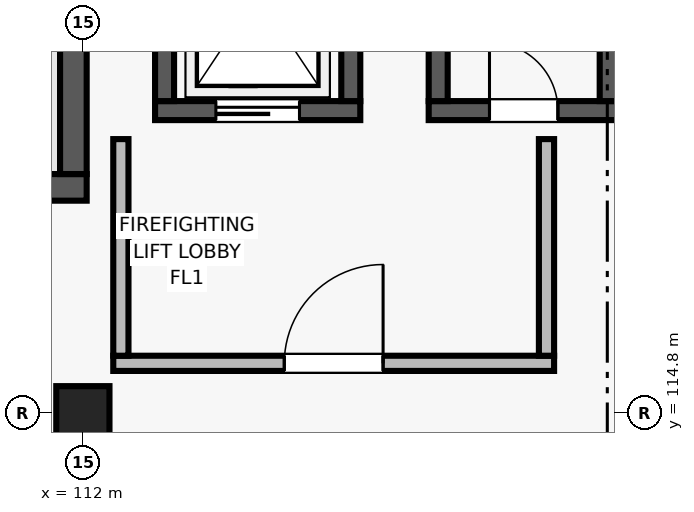
"""IFC4 building model, lengths in metres.
Left out: names, types, materials, properties, quantities, classifications, styles, units other than length and angle.
Written with IfcOpenShell. Run it as: python <this file> out.ifc"""

import sys

from ifc_helpers import new_model, si_unit, direction, frame, frame_2d, origin, origin_2d, place, context, subcontext, project, spatial, rectangle, extrude, element, fill, save


model = new_model("IFC4")
c1 = context("Model", 3, precision=1e-05, world=origin(), true_north=direction((0.0, 1.0)))
c2 = subcontext(c1, "Body", "Model", "MODEL_VIEW")
j1 = project(units=[si_unit("LENGTHUNIT", "METRE"), si_unit("PLANEANGLEUNIT", "RADIAN")], contexts=[c1])
p1 = place(None, origin())
s1 = spatial("IfcSite", under=j1, at=p1, CompositionType="ELEMENT")
p2 = place(p1, origin())
s2 = spatial("IfcBuilding", under=s1, at=p2, CompositionType="ELEMENT")
p3 = place(p2, origin())
s3 = spatial("IfcBuildingStorey", under=s2, at=p3, CompositionType="ELEMENT", Elevation=0.0)
p4 = place(p3, frame((112.0, 114.8, 0.0), z_axis=(0.0, 0.0, 1.0), x_axis=(1.0, 0.0, 0.0)))
e1 = element("IfcColumn", 1, at=p4, inside=s3, PredefinedType="COLUMN", context=c2, shape_type="SweptSolid", body=[
    extrude(rectangle(XDim=0.7, YDim=0.7, at=origin_2d()), origin(), (0.0, 0.0, 1.0), 4.5),
])
p5 = place(p3, frame((103.95, 117.765, 0.0), z_axis=(0.0, 0.0, 1.0), x_axis=(1.0, 0.0, 0.0)))
e2 = element("IfcWall", 2, at=p5, inside=s3, PredefinedType="SHEAR", context=c2, shape_type="SweptSolid", body=[
    extrude(rectangle(XDim=8.1, YDim=0.35, at=frame_2d((4.05, 0.0))), origin(), (0.0, 0.0, 1.0), 4.22),
])
p6 = place(p5, frame((0.6, 0.0, 0.0)))
e3 = element("IfcOpeningElement", 3, at=p6, cuts=e2, PredefinedType="OPENING", context=c2, shape_type="SweptSolid", body=[
    extrude(rectangle(XDim=1.25, YDim=2.2, at=frame_2d((0.625, 1.1))), frame((0.0, 0.185, 0.0), z_axis=(0.0, -1.0, 0.0), x_axis=(1.0, 0.0, 0.0)), (0.0, 0.0, 1.0), 0.37),
])
p7 = place(p3, frame((111.875, 117.94, 0.0), z_axis=(0.0, 0.0, 1.0), x_axis=(0.0, 1.0, 0.0)))
e4 = element("IfcWall", 4, at=p7, inside=s3, PredefinedType="SHEAR", context=c2, shape_type="SweptSolid", body=[
    extrude(rectangle(XDim=3.76, YDim=0.35, at=frame_2d((1.88, 0.0))), origin(), (0.0, 0.0, 1.0), 4.22),
])
p8 = place(p3, frame((112.95, 118.775, 0.0), z_axis=(0.0, 0.0, 1.0), x_axis=(1.0, 0.0, 0.0)))
e5 = element("IfcWall", 5, at=p8, inside=s3, PredefinedType="SHEAR", context=c2, shape_type="SweptSolid", body=[
    extrude(rectangle(XDim=2.7, YDim=0.25, at=frame_2d((1.35, 0.0))), origin(), (0.0, 0.0, 1.0), 4.22),
])
p9 = place(p8, frame((0.8, 0.0, 0.0)))
e6 = element("IfcOpeningElement", 6, at=p9, cuts=e5, PredefinedType="OPENING", context=c2, shape_type="SweptSolid", body=[
    extrude(rectangle(XDim=1.1, YDim=2.15, at=frame_2d((0.55, 1.075))), frame((0.0, 0.135, 0.0), z_axis=(0.0, -1.0, 0.0), x_axis=(1.0, 0.0, 0.0)), (0.0, 0.0, 1.0), 0.27),
])
for number, where, z_axis, x_axis in (
    (7, (113.075, 118.9, 0.0), (0.0, 0.0, 1.0), (0.0, 1.0, 0.0)),
    (8, (115.525, 118.9, 0.0), (0.0, 0.0, 1.0), (0.0, 1.0, 0.0)),
):
    element("IfcWall", number, at=place(p3, frame(where, z_axis=z_axis, x_axis=x_axis)), inside=s3, PredefinedType="SHEAR", context=c2, shape_type="SweptSolid", body=[
        extrude(rectangle(XDim=2.8, YDim=0.25, at=frame_2d((1.4, 0.0))), origin(), (0.0, 0.0, 1.0), 4.22),
    ])
p10 = place(p3, frame((112.4, 115.45, 0.0), z_axis=(0.0, 0.0, 1.0), x_axis=(1.0, 0.0, 0.0)))
e9 = element("IfcWall", 9, at=p10, inside=s3, PredefinedType="SOLIDWALL", context=c2, shape_type="SweptSolid", body=[
    extrude(rectangle(XDim=5.8, YDim=0.2, at=frame_2d((2.9, 0.0))), origin(), (0.0, 0.0, 1.0), 4.22),
])
p11 = place(p10, frame((2.25, 0.0, 0.0)))
e10 = element("IfcOpeningElement", 10, at=p11, cuts=e9, PredefinedType="OPENING", context=c2, shape_type="SweptSolid", body=[
    extrude(rectangle(XDim=1.3, YDim=2.2, at=frame_2d((0.65, 1.1))), frame((0.0, 0.11, 0.0), z_axis=(0.0, -1.0, 0.0), x_axis=(1.0, 0.0, 0.0)), (0.0, 0.0, 1.0), 0.22),
])
for number, where, z_axis, x_axis in (
    (11, (112.5, 115.55, 0.0), (0.0, 0.0, 1.0), (0.0, 1.0, 0.0)),
    (12, (118.1, 115.55, 0.0), (0.0, 0.0, 1.0), (0.0, 1.0, 0.0)),
):
    element("IfcWall", number, at=place(p3, frame(where, z_axis=z_axis, x_axis=x_axis)), inside=s3, PredefinedType="SOLIDWALL", context=c2, shape_type="SweptSolid", body=[
        extrude(rectangle(XDim=2.85, YDim=0.2, at=frame_2d((1.425, 0.0))), origin(), (0.0, 0.0, 1.0), 4.22),
    ])
p12 = place(p3, frame((116.55, 118.775, 0.0), z_axis=(0.0, 0.0, 1.0), x_axis=(1.0, 0.0, 0.0)))
e13 = element("IfcWall", 13, at=p12, inside=s3, PredefinedType="SHEAR", context=c2, shape_type="SweptSolid", body=[
    extrude(rectangle(XDim=2.5, YDim=0.25, at=frame_2d((1.25, 0.0))), origin(), (0.0, 0.0, 1.0), 4.22),
])
p13 = place(p12, frame((0.8, 0.0, 0.0)))
e14 = element("IfcOpeningElement", 14, at=p13, cuts=e13, PredefinedType="OPENING", context=c2, shape_type="SweptSolid", body=[
    extrude(rectangle(XDim=0.9, YDim=2.05, at=frame_2d((0.45, 1.025))), frame((0.0, 0.135, 0.0), z_axis=(0.0, -1.0, 0.0), x_axis=(1.0, 0.0, 0.0)), (0.0, 0.0, 1.0), 0.27),
])
for number, where, z_axis, x_axis in (
    (15, (116.675, 118.9, 0.0), (0.0, 0.0, 1.0), (0.0, 1.0, 0.0)),
    (16, (118.925, 118.9, 0.0), (0.0, 0.0, 1.0), (0.0, 1.0, 0.0)),
):
    element("IfcWall", number, at=place(p3, frame(where, z_axis=z_axis, x_axis=x_axis)), inside=s3, PredefinedType="SHEAR", context=c2, shape_type="SweptSolid", body=[
        extrude(rectangle(XDim=2.8, YDim=0.25, at=frame_2d((1.4, 0.0))), origin(), (0.0, 0.0, 1.0), 4.22),
    ])
p14 = place(p11, origin())
e17 = element("IfcDoor", 17, at=p14, inside=s3, OperationType="SINGLE_SWING_RIGHT", PredefinedType="DOOR", context=c2, shape_type="SweptSolid", body=[
    extrude(rectangle(XDim=1.3, YDim=2.2, at=frame_2d((0.65, 1.1))), frame((0.0, 0.025, 0.0), z_axis=(0.0, -1.0, 0.0), x_axis=(1.0, 0.0, 0.0)), (0.0, 0.0, 1.0), 0.05),
])
fill(e10, e17)
p15 = place(p13, origin())
e18 = element("IfcDoor", 18, at=p15, inside=s3, OperationType="SINGLE_SWING_LEFT", PredefinedType="DOOR", context=c2, shape_type="SweptSolid", body=[
    extrude(rectangle(XDim=0.9, YDim=2.05, at=frame_2d((0.45, 1.025))), frame((0.0, 0.025, 0.0), z_axis=(0.0, -1.0, 0.0), x_axis=(1.0, 0.0, 0.0)), (0.0, 0.0, 1.0), 0.05),
])
fill(e14, e18)
p16 = place(p9, origin())
e19 = element("IfcDoor", 19, at=p16, inside=s3, OperationType="SLIDING_TO_LEFT", PredefinedType="DOOR", context=c2, shape_type="SweptSolid", body=[
    extrude(rectangle(XDim=1.1, YDim=2.15, at=frame_2d((0.55, 1.075))), frame((0.0, 0.025, 0.0), z_axis=(0.0, -1.0, 0.0), x_axis=(1.0, 0.0, 0.0)), (0.0, 0.0, 1.0), 0.05),
])
fill(e6, e19)
save(model, sys.argv[1])
